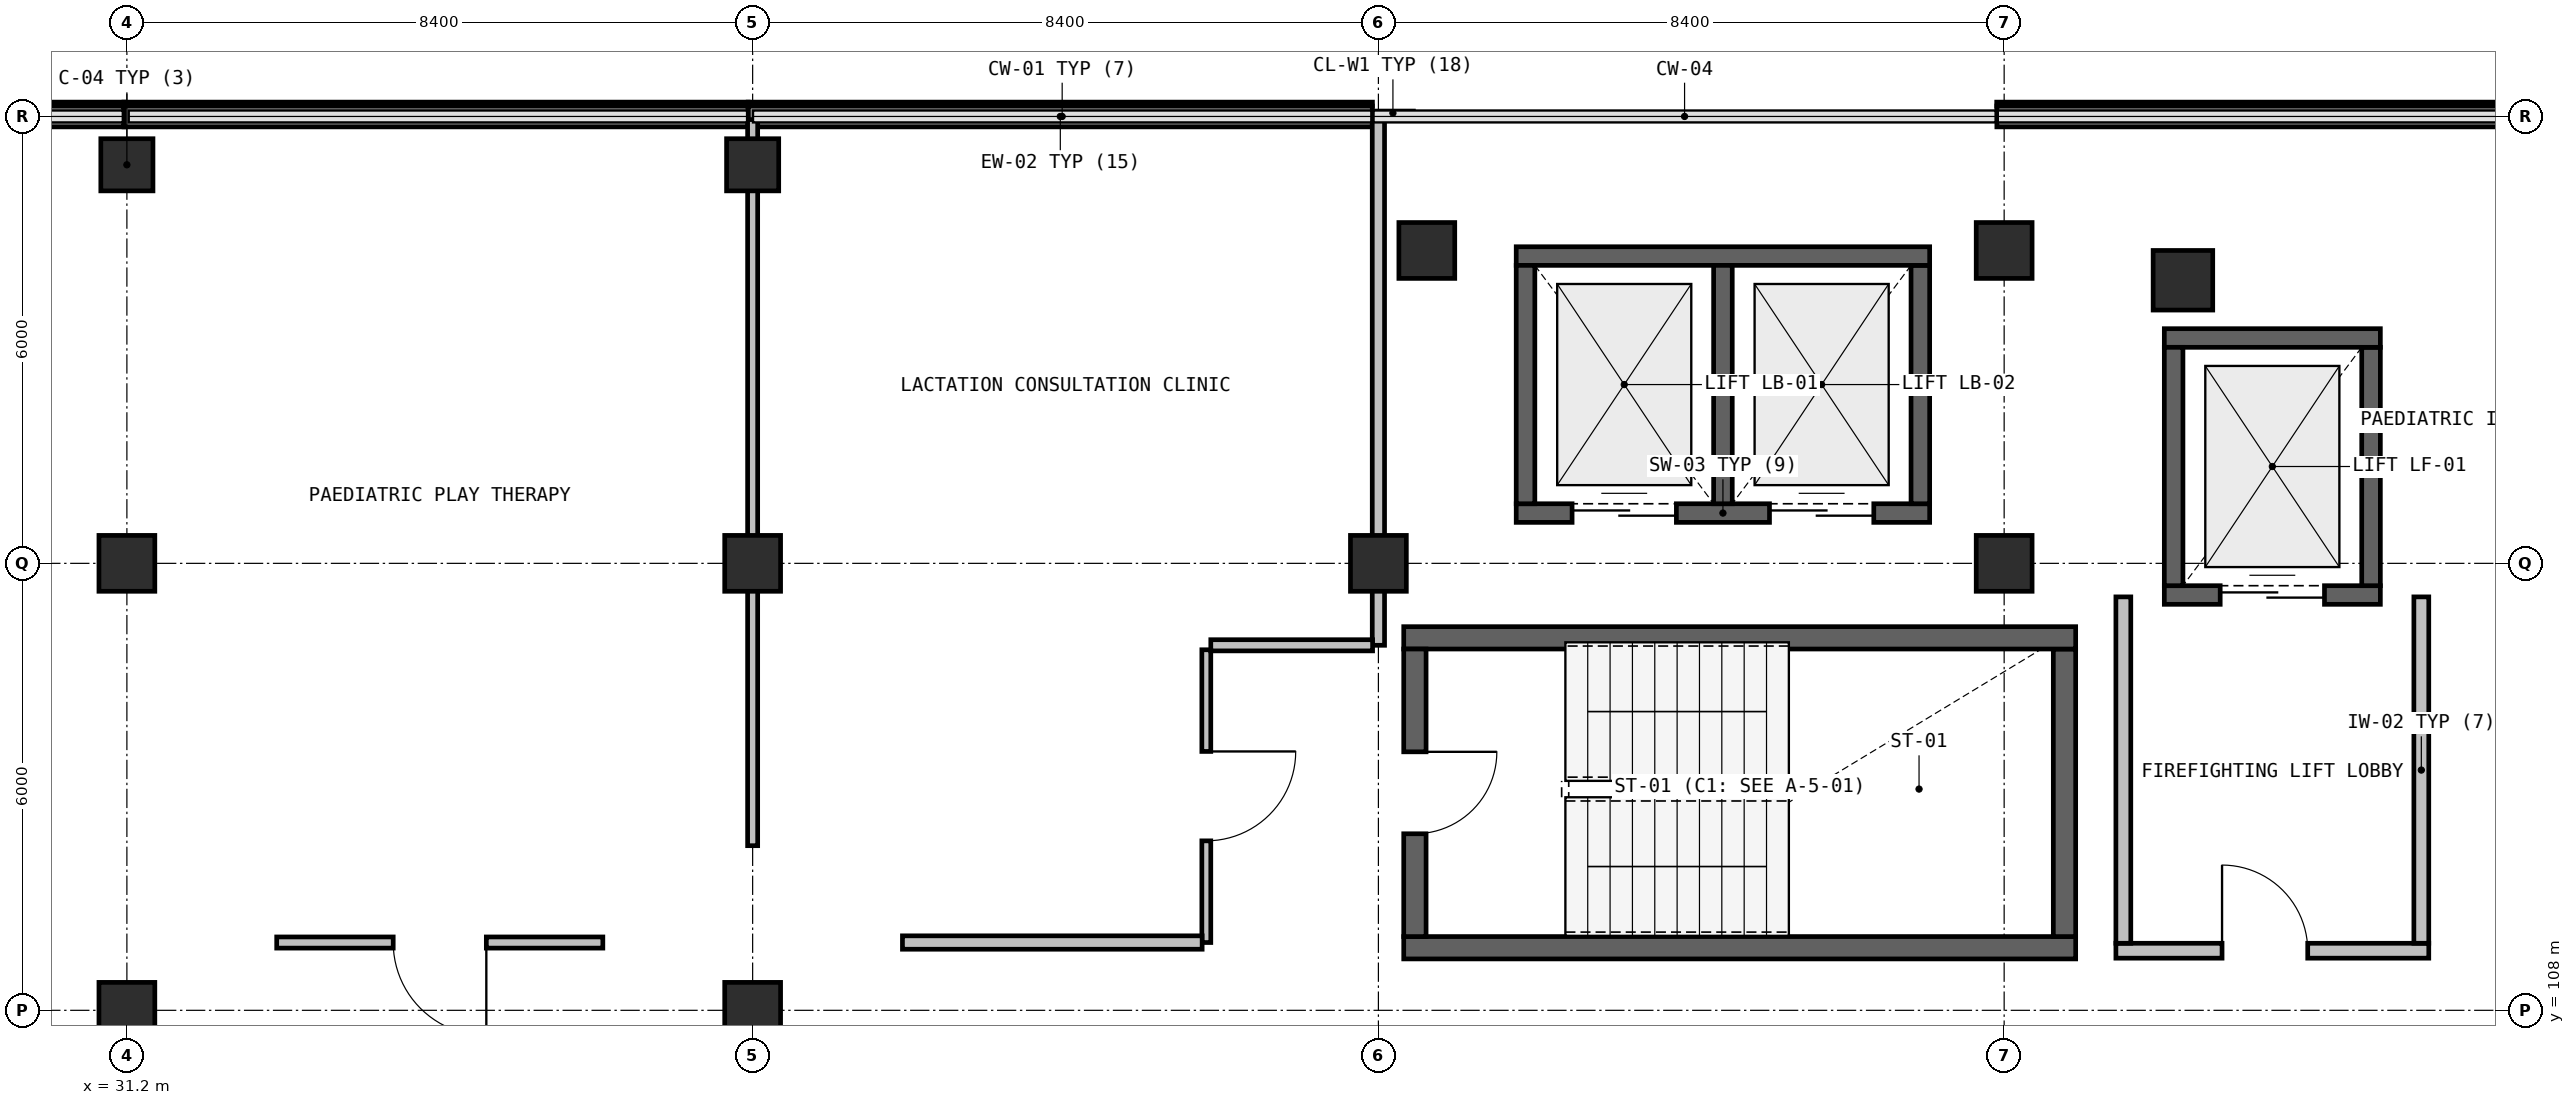
"""IFC4 building model, lengths in metres.
Left out: names, types, materials, properties, quantities, classifications, styles, units other than length and angle.
Written with IfcOpenShell. Run it as: python <this file> out.ifc"""

import sys

from ifc_helpers import new_model, si_unit, direction, frame, frame_2d, origin, origin_2d, place, context, subcontext, project, spatial, rectangle, extrude, element, fill, save


model = new_model("IFC4")
c1 = context("Model", 3, precision=1e-05, world=origin(), true_north=direction((0.0, 1.0)))
c2 = subcontext(c1, "Body", "Model", "MODEL_VIEW")
j1 = project(units=[si_unit("LENGTHUNIT", "METRE"), si_unit("PLANEANGLEUNIT", "RADIAN")], contexts=[c1])
p1 = place(None, origin())
s1 = spatial("IfcSite", under=j1, at=p1, CompositionType="ELEMENT")
p2 = place(p1, origin())
s2 = spatial("IfcBuilding", under=s1, at=p2, CompositionType="ELEMENT")
p3 = place(p2, frame((0.0, 0.0, 19.2)))
s3 = spatial("IfcBuildingStorey", under=s2, at=p3, CompositionType="ELEMENT", Elevation=19.2)
p4 = place(p3, frame((58.8, 117.8, 0.0), z_axis=(0.0, 0.0, 1.0), x_axis=(1.0, 0.0, 0.0)))
e1 = element("IfcColumn", 1, at=p4, inside=s3, PredefinedType="COLUMN", context=c2, shape_type="SweptSolid", body=[
    extrude(rectangle(XDim=0.8, YDim=0.8, at=origin_2d()), origin(), (0.0, 0.0, 1.0), 4.05),
])
for number, where, z_axis, x_axis in (
    (2, (48.65, 118.2, 0.0), (0.0, 0.0, 1.0), (1.0, 0.0, 0.0)),
    (3, (56.4, 118.2, 0.0), (0.0, 0.0, 1.0), (1.0, 0.0, 0.0)),
    (4, (31.2, 108.0, 0.0), (0.0, 0.0, 1.0), (1.0, 0.0, 0.0)),
    (5, (31.2, 114.0, 0.0), (0.0, 0.0, 1.0), (1.0, 0.0, 0.0)),
):
    element("IfcColumn", number, at=place(p3, frame(where, z_axis=z_axis, x_axis=x_axis)), inside=s3, PredefinedType="COLUMN", context=c2, shape_type="SweptSolid", body=[
        extrude(rectangle(XDim=0.75, YDim=0.75, at=origin_2d()), origin(), (0.0, 0.0, 1.0), 4.05),
    ])
p5 = place(p3, frame((31.2, 119.35, 0.0), z_axis=(0.0, 0.0, 1.0), x_axis=(1.0, 0.0, 0.0)))
e6 = element("IfcColumn", 6, at=p5, inside=s3, PredefinedType="COLUMN", context=c2, shape_type="SweptSolid", body=[
    extrude(rectangle(XDim=0.7, YDim=0.7, at=origin_2d()), origin(), (0.0, 0.0, 1.0), 4.05),
])
for number, where, z_axis, x_axis in (
    (7, (39.6, 108.0, 0.0), (0.0, 0.0, 1.0), (1.0, 0.0, 0.0)),
    (8, (39.6, 114.0, 0.0), (0.0, 0.0, 1.0), (1.0, 0.0, 0.0)),
):
    element("IfcColumn", number, at=place(p3, frame(where, z_axis=z_axis, x_axis=x_axis)), inside=s3, PredefinedType="COLUMN", context=c2, shape_type="SweptSolid", body=[
        extrude(rectangle(XDim=0.75, YDim=0.75, at=origin_2d()), origin(), (0.0, 0.0, 1.0), 4.05),
    ])
p6 = place(p3, frame((39.6, 119.35, 0.0), z_axis=(0.0, 0.0, 1.0), x_axis=(1.0, 0.0, 0.0)))
e9 = element("IfcColumn", 9, at=p6, inside=s3, PredefinedType="COLUMN", context=c2, shape_type="SweptSolid", body=[
    extrude(rectangle(XDim=0.7, YDim=0.7, at=origin_2d()), origin(), (0.0, 0.0, 1.0), 4.05),
])
for number, where, z_axis, x_axis in (
    (10, (48.0, 114.0, 0.0), (0.0, 0.0, 1.0), (1.0, 0.0, 0.0)),
    (11, (56.4, 114.0, 0.0), (0.0, 0.0, 1.0), (1.0, 0.0, 0.0)),
):
    element("IfcColumn", number, at=place(p3, frame(where, z_axis=z_axis, x_axis=x_axis)), inside=s3, PredefinedType="COLUMN", context=c2, shape_type="SweptSolid", body=[
        extrude(rectangle(XDim=0.75, YDim=0.75, at=origin_2d()), origin(), (0.0, 0.0, 1.0), 4.05),
    ])
for number, where, z_axis, x_axis in (
    (12, (22.782, 119.999, 0.0), (0.0, 0.0, 1.0), (1.0, 0.0, 0.0)),
    (13, (31.162, 119.999, 0.0), (0.0, 0.0, 1.0), (1.0, 0.0, 0.0)),
    (14, (39.542, 119.999, 0.0), (0.0, 0.0, 1.0), (1.0, 0.0, 0.0)),
    (15, (56.302, 119.999, 0.0), (0.0, 0.0, 1.0), (1.0, 0.0, 0.0)),
):
    element("IfcWall", number, at=place(p3, frame(where, z_axis=z_axis, x_axis=x_axis)), inside=s3, PredefinedType="SOLIDWALL", context=c2, shape_type="SweptSolid", body=[
        extrude(rectangle(XDim=8.376, YDim=0.28, at=frame_2d((4.188, 0.0))), origin(), (0.0, 0.0, 1.0), 0.94),
    ])
p7 = place(p3, frame((48.34, 108.84, 0.0), z_axis=(0.0, 0.0, 1.0), x_axis=(1.0, 0.0, 0.0)))
e16 = element("IfcWall", 16, at=p7, inside=s3, PredefinedType="SHEAR", context=c2, shape_type="SweptSolid", body=[
    extrude(rectangle(XDim=9.02, YDim=0.3, at=frame_2d((4.51, 0.0))), origin(), (0.0, 0.0, 1.0), 3.77),
])
p8 = place(p3, frame((57.21, 108.99, 0.0), z_axis=(0.0, 0.0, 1.0), x_axis=(0.0, 1.0, 0.0)))
e17 = element("IfcWall", 17, at=p8, inside=s3, PredefinedType="SHEAR", context=c2, shape_type="SweptSolid", body=[
    extrude(rectangle(XDim=3.86, YDim=0.3, at=frame_2d((1.93, 0.0))), origin(), (0.0, 0.0, 1.0), 3.77),
])
p9 = place(p3, frame((57.36, 113.0, 0.0), z_axis=(0.0, 0.0, 1.0), x_axis=(-1.0, 0.0, 0.0)))
e18 = element("IfcWall", 18, at=p9, inside=s3, PredefinedType="SHEAR", context=c2, shape_type="SweptSolid", body=[
    extrude(rectangle(XDim=9.02, YDim=0.3, at=frame_2d((4.51, 0.0))), origin(), (0.0, 0.0, 1.0), 3.77),
])
p10 = place(p3, frame((48.49, 112.85, 0.0), z_axis=(0.0, 0.0, 1.0), x_axis=(0.0, -1.0, 0.0)))
e19 = element("IfcWall", 19, at=p10, inside=s3, PredefinedType="SHEAR", context=c2, shape_type="SweptSolid", body=[
    extrude(rectangle(XDim=3.86, YDim=0.3, at=frame_2d((1.93, 0.0))), origin(), (0.0, 0.0, 1.0), 3.77),
])
p11 = place(p10, frame((1.38, 0.0, 0.0)))
e20 = element("IfcOpeningElement", 20, at=p11, cuts=e19, PredefinedType="OPENING", context=c2, shape_type="SweptSolid", body=[
    extrude(rectangle(XDim=1.1, YDim=2.15, at=frame_2d((0.55, 1.075))), frame((0.0, 0.16, 0.0), z_axis=(0.0, -1.0, 0.0), x_axis=(1.0, 0.0, 0.0)), (0.0, 0.0, 1.0), 0.32),
])
p12 = place(p3, frame((57.9, 108.8, 0.0), z_axis=(0.0, 0.0, 1.0), x_axis=(1.0, 0.0, 0.0)))
e21 = element("IfcWall", 21, at=p12, inside=s3, PredefinedType="SOLIDWALL", context=c2, shape_type="SweptSolid", body=[
    extrude(rectangle(XDim=4.2, YDim=0.2, at=frame_2d((2.1, 0.0))), origin(), (0.0, 0.0, 1.0), 3.77),
])
p13 = place(p12, frame((1.425, 0.0, 0.0)))
e22 = element("IfcOpeningElement", 22, at=p13, cuts=e21, PredefinedType="OPENING", context=c2, shape_type="SweptSolid", body=[
    extrude(rectangle(XDim=1.15, YDim=2.15, at=frame_2d((0.575, 1.075))), frame((0.0, 0.11, 0.0), z_axis=(0.0, -1.0, 0.0), x_axis=(1.0, 0.0, 0.0)), (0.0, 0.0, 1.0), 0.22),
])
for number, where, z_axis, x_axis in (
    (23, (62.0, 108.9, 0.0), (0.0, 0.0, 1.0), (0.0, 1.0, 0.0)),
    (24, (58.0, 113.55, 0.0), (0.0, 0.0, 1.0), (0.0, -1.0, 0.0)),
):
    element("IfcWall", number, at=place(p3, frame(where, z_axis=z_axis, x_axis=x_axis)), inside=s3, PredefinedType="SOLIDWALL", context=c2, shape_type="SweptSolid", body=[
        extrude(rectangle(XDim=4.65, YDim=0.2, at=frame_2d((2.325, 0.0))), origin(), (0.0, 0.0, 1.0), 3.77),
    ])
p14 = place(p3, frame((58.55, 113.575, 0.0), z_axis=(0.0, 0.0, 1.0), x_axis=(1.0, 0.0, 0.0)))
e25 = element("IfcWall", 25, at=p14, inside=s3, PredefinedType="SHEAR", context=c2, shape_type="SweptSolid", body=[
    extrude(rectangle(XDim=2.9, YDim=0.25, at=frame_2d((1.45, 0.0))), origin(), (0.0, 0.0, 1.0), 3.77),
])
p15 = place(p14, frame((0.75, 0.0, 0.0)))
e26 = element("IfcOpeningElement", 26, at=p15, cuts=e25, PredefinedType="OPENING", context=c2, shape_type="SweptSolid", body=[
    extrude(rectangle(XDim=1.4, YDim=2.15, at=frame_2d((0.7, 1.075))), frame((0.0, 0.135, 0.0), z_axis=(0.0, -1.0, 0.0), x_axis=(1.0, 0.0, 0.0)), (0.0, 0.0, 1.0), 0.27),
])
p16 = place(p3, frame((61.325, 113.7, 0.0), z_axis=(0.0, 0.0, 1.0), x_axis=(0.0, 1.0, 0.0)))
e27 = element("IfcWall", 27, at=p16, inside=s3, PredefinedType="SHEAR", context=c2, shape_type="SweptSolid", body=[
    extrude(rectangle(XDim=3.2, YDim=0.25, at=frame_2d((1.6, 0.0))), origin(), (0.0, 0.0, 1.0), 3.77),
])
p17 = place(p3, frame((61.45, 117.025, 0.0), z_axis=(0.0, 0.0, 1.0), x_axis=(-1.0, 0.0, 0.0)))
e28 = element("IfcWall", 28, at=p17, inside=s3, PredefinedType="SHEAR", context=c2, shape_type="SweptSolid", body=[
    extrude(rectangle(XDim=2.9, YDim=0.25, at=frame_2d((1.45, 0.0))), origin(), (0.0, 0.0, 1.0), 3.77),
])
p18 = place(p3, frame((58.675, 116.9, 0.0), z_axis=(0.0, 0.0, 1.0), x_axis=(0.0, -1.0, 0.0)))
e29 = element("IfcWall", 29, at=p18, inside=s3, PredefinedType="SHEAR", context=c2, shape_type="SweptSolid", body=[
    extrude(rectangle(XDim=3.2, YDim=0.25, at=frame_2d((1.6, 0.0))), origin(), (0.0, 0.0, 1.0), 3.77),
])
p19 = place(p3, frame((49.85, 114.675, 0.0), z_axis=(0.0, 0.0, 1.0), x_axis=(1.0, 0.0, 0.0)))
e30 = element("IfcWall", 30, at=p19, inside=s3, PredefinedType="SHEAR", context=c2, shape_type="SweptSolid", body=[
    extrude(rectangle(XDim=5.55, YDim=0.25, at=frame_2d((2.775, 0.0))), origin(), (0.0, 0.0, 1.0), 3.77),
])
p20 = place(p19, frame((0.75, 0.0, 0.0)))
e31 = element("IfcOpeningElement", 31, at=p20, cuts=e30, PredefinedType="OPENING", context=c2, shape_type="SweptSolid", body=[
    extrude(rectangle(XDim=1.4, YDim=2.2, at=frame_2d((0.7, 1.1))), frame((0.0, 0.135, 0.0), z_axis=(0.0, -1.0, 0.0), x_axis=(1.0, 0.0, 0.0)), (0.0, 0.0, 1.0), 0.27),
])
p21 = place(p19, frame((3.4, 0.0, 0.0)))
e32 = element("IfcOpeningElement", 32, at=p21, cuts=e30, PredefinedType="OPENING", context=c2, shape_type="SweptSolid", body=[
    extrude(rectangle(XDim=1.4, YDim=2.2, at=frame_2d((0.7, 1.1))), frame((0.0, 0.135, 0.0), z_axis=(0.0, -1.0, 0.0), x_axis=(1.0, 0.0, 0.0)), (0.0, 0.0, 1.0), 0.27),
])
p22 = place(p3, frame((55.275, 114.8, 0.0), z_axis=(0.0, 0.0, 1.0), x_axis=(0.0, 1.0, 0.0)))
e33 = element("IfcWall", 33, at=p22, inside=s3, PredefinedType="SHEAR", context=c2, shape_type="SweptSolid", body=[
    extrude(rectangle(XDim=3.2, YDim=0.25, at=frame_2d((1.6, 0.0))), origin(), (0.0, 0.0, 1.0), 3.77),
])
p23 = place(p3, frame((55.4, 118.125, 0.0), z_axis=(0.0, 0.0, 1.0), x_axis=(-1.0, 0.0, 0.0)))
e34 = element("IfcWall", 34, at=p23, inside=s3, PredefinedType="SHEAR", context=c2, shape_type="SweptSolid", body=[
    extrude(rectangle(XDim=5.55, YDim=0.25, at=frame_2d((2.775, 0.0))), origin(), (0.0, 0.0, 1.0), 3.77),
])
for number, where, z_axis, x_axis in (
    (35, (49.975, 118.0, 0.0), (0.0, 0.0, 1.0), (0.0, -1.0, 0.0)),
    (36, (52.625, 114.8, 0.0), (0.0, 0.0, 1.0), (0.0, 1.0, 0.0)),
):
    element("IfcWall", number, at=place(p3, frame(where, z_axis=z_axis, x_axis=x_axis)), inside=s3, PredefinedType="SHEAR", context=c2, shape_type="SweptSolid", body=[
        extrude(rectangle(XDim=3.2, YDim=0.25, at=frame_2d((1.6, 0.0))), origin(), (0.0, 0.0, 1.0), 3.77),
    ])
p24 = place(p3, frame((37.589, 108.91, 0.0), z_axis=(0.0, 0.0, 1.0), x_axis=(-1.0, 0.0, 0.0)))
e37 = element("IfcWall", 37, at=p24, inside=s3, PredefinedType="PARTITIONING", context=c2, shape_type="SweptSolid", body=[
    extrude(rectangle(XDim=4.378, YDim=0.15, at=frame_2d((2.189, 0.0))), origin(), (0.0, 0.0, 1.0), 3.77),
])
p25 = place(p24, frame((1.564, 0.0, 0.0)))
e38 = element("IfcOpeningElement", 38, at=p25, cuts=e37, PredefinedType="OPENING", context=c2, shape_type="SweptSolid", body=[
    extrude(rectangle(XDim=1.25, YDim=2.15, at=frame_2d((0.625, 1.075))), frame((0.0, 0.085, 0.0), z_axis=(0.0, -1.0, 0.0), x_axis=(1.0, 0.0, 0.0)), (0.0, 0.0, 1.0), 0.17),
])
p26 = place(p3, frame((39.6, 119.957, 0.0), z_axis=(0.0, 0.0, 1.0), x_axis=(0.0, -1.0, 0.0)))
e39 = element("IfcWall", 39, at=p26, inside=s3, PredefinedType="PARTITIONING", context=c2, shape_type="SweptSolid", body=[
    extrude(rectangle(XDim=9.747, YDim=0.135, at=frame_2d((4.874, 0.0))), origin(), (0.0, 0.0, 1.0), 3.12),
])
p27 = place(p3, frame((45.69, 112.84, 0.0), z_axis=(0.0, 0.0, 1.0), x_axis=(0.0, -1.0, 0.0)))
e40 = element("IfcWall", 40, at=p27, inside=s3, PredefinedType="PARTITIONING", context=c2, shape_type="SweptSolid", body=[
    extrude(rectangle(XDim=3.93, YDim=0.12, at=frame_2d((1.965, 0.0))), origin(), (0.0, 0.0, 1.0), 3.77),
])
p28 = place(p27, frame((1.365, 0.0, 0.0)))
e41 = element("IfcOpeningElement", 41, at=p28, cuts=e40, PredefinedType="OPENING", context=c2, shape_type="SweptSolid", body=[
    extrude(rectangle(XDim=1.2, YDim=2.15, at=frame_2d((0.6, 1.075))), frame((0.0, 0.07, 0.0), z_axis=(0.0, -1.0, 0.0), x_axis=(1.0, 0.0, 0.0)), (0.0, 0.0, 1.0), 0.14),
])
p29 = place(p3, frame((45.634, 108.91, 0.0), z_axis=(0.0, 0.0, 1.0), x_axis=(-1.0, 0.0, 0.0)))
e42 = element("IfcWall", 42, at=p29, inside=s3, PredefinedType="PARTITIONING", context=c2, shape_type="SweptSolid", body=[
    extrude(rectangle(XDim=4.023, YDim=0.18, at=frame_2d((2.011, 0.0))), origin(), (0.0, 0.0, 1.0), 3.77),
])
p30 = place(p3, frame((48.0, 119.988, 0.0), z_axis=(0.0, 0.0, 1.0), x_axis=(0.0, -1.0, 0.0)))
e43 = element("IfcWall", 43, at=p30, inside=s3, PredefinedType="PARTITIONING", context=c2, shape_type="SweptSolid", body=[
    extrude(rectangle(XDim=7.088, YDim=0.165, at=frame_2d((3.544, 0.0))), origin(), (0.0, 0.0, 1.0), 3.12),
])
p31 = place(p3, frame((47.922, 112.9, 0.0), z_axis=(0.0, 0.0, 1.0), x_axis=(-1.0, 0.0, 0.0)))
e44 = element("IfcWall", 44, at=p31, inside=s3, PredefinedType="PARTITIONING", context=c2, shape_type="SweptSolid", body=[
    extrude(rectangle(XDim=2.172, YDim=0.15, at=frame_2d((1.086, 0.0))), origin(), (0.0, 0.0, 1.0), 3.77),
])
p32 = place(p11, origin())
e45 = element("IfcDoor", 45, at=p32, inside=s3, OperationType="SINGLE_SWING_RIGHT", PredefinedType="DOOR", context=c2, shape_type="SweptSolid", body=[
    extrude(rectangle(XDim=1.1, YDim=2.15, at=frame_2d((0.55, 1.075))), frame((0.0, 0.025, 0.0), z_axis=(0.0, -1.0, 0.0), x_axis=(1.0, 0.0, 0.0)), (0.0, 0.0, 1.0), 0.05),
])
fill(e20, e45)
p33 = place(p13, origin())
e46 = element("IfcDoor", 46, at=p33, inside=s3, OperationType="SINGLE_SWING_LEFT", PredefinedType="DOOR", context=c2, shape_type="SweptSolid", body=[
    extrude(rectangle(XDim=1.15, YDim=2.15, at=frame_2d((0.575, 1.075))), frame((0.0, 0.025, 0.0), z_axis=(0.0, -1.0, 0.0), x_axis=(1.0, 0.0, 0.0)), (0.0, 0.0, 1.0), 0.05),
])
fill(e22, e46)
p34 = place(p15, origin())
e47 = element("IfcDoor", 47, at=p34, inside=s3, OperationType="DOUBLE_DOOR_SLIDING", PredefinedType="DOOR", context=c2, shape_type="SweptSolid", body=[
    extrude(rectangle(XDim=1.4, YDim=2.15, at=frame_2d((0.7, 1.075))), frame((0.0, 0.025, 0.0), z_axis=(0.0, -1.0, 0.0), x_axis=(1.0, 0.0, 0.0)), (0.0, 0.0, 1.0), 0.05),
])
fill(e26, e47)
p35 = place(p20, origin())
e48 = element("IfcDoor", 48, at=p35, inside=s3, OperationType="DOUBLE_DOOR_SLIDING", PredefinedType="DOOR", context=c2, shape_type="SweptSolid", body=[
    extrude(rectangle(XDim=1.4, YDim=2.2, at=frame_2d((0.7, 1.1))), frame((0.0, 0.025, 0.0), z_axis=(0.0, -1.0, 0.0), x_axis=(1.0, 0.0, 0.0)), (0.0, 0.0, 1.0), 0.05),
])
fill(e31, e48)
p36 = place(p21, origin())
e49 = element("IfcDoor", 49, at=p36, inside=s3, OperationType="DOUBLE_DOOR_SLIDING", PredefinedType="DOOR", context=c2, shape_type="SweptSolid", body=[
    extrude(rectangle(XDim=1.4, YDim=2.2, at=frame_2d((0.7, 1.1))), frame((0.0, 0.025, 0.0), z_axis=(0.0, -1.0, 0.0), x_axis=(1.0, 0.0, 0.0)), (0.0, 0.0, 1.0), 0.05),
])
fill(e32, e49)
p37 = place(p25, origin())
e50 = element("IfcDoor", 50, at=p37, inside=s3, OperationType="SINGLE_SWING_RIGHT", PredefinedType="DOOR", context=c2, shape_type="SweptSolid", body=[
    extrude(rectangle(XDim=1.25, YDim=2.15, at=frame_2d((0.625, 1.075))), frame((0.0, 0.025, 0.0), z_axis=(0.0, -1.0, 0.0), x_axis=(1.0, 0.0, 0.0)), (0.0, 0.0, 1.0), 0.05),
])
fill(e38, e50)
p38 = place(p28, origin())
e51 = element("IfcDoor", 51, at=p38, inside=s3, OperationType="SINGLE_SWING_LEFT", PredefinedType="DOOR", context=c2, shape_type="SweptSolid", body=[
    extrude(rectangle(XDim=1.2, YDim=2.15, at=frame_2d((0.6, 1.075))), frame((0.0, 0.025, 0.0), z_axis=(0.0, -1.0, 0.0), x_axis=(1.0, 0.0, 0.0)), (0.0, 0.0, 1.0), 0.05),
])
fill(e41, e51)
save(model, sys.argv[1])
